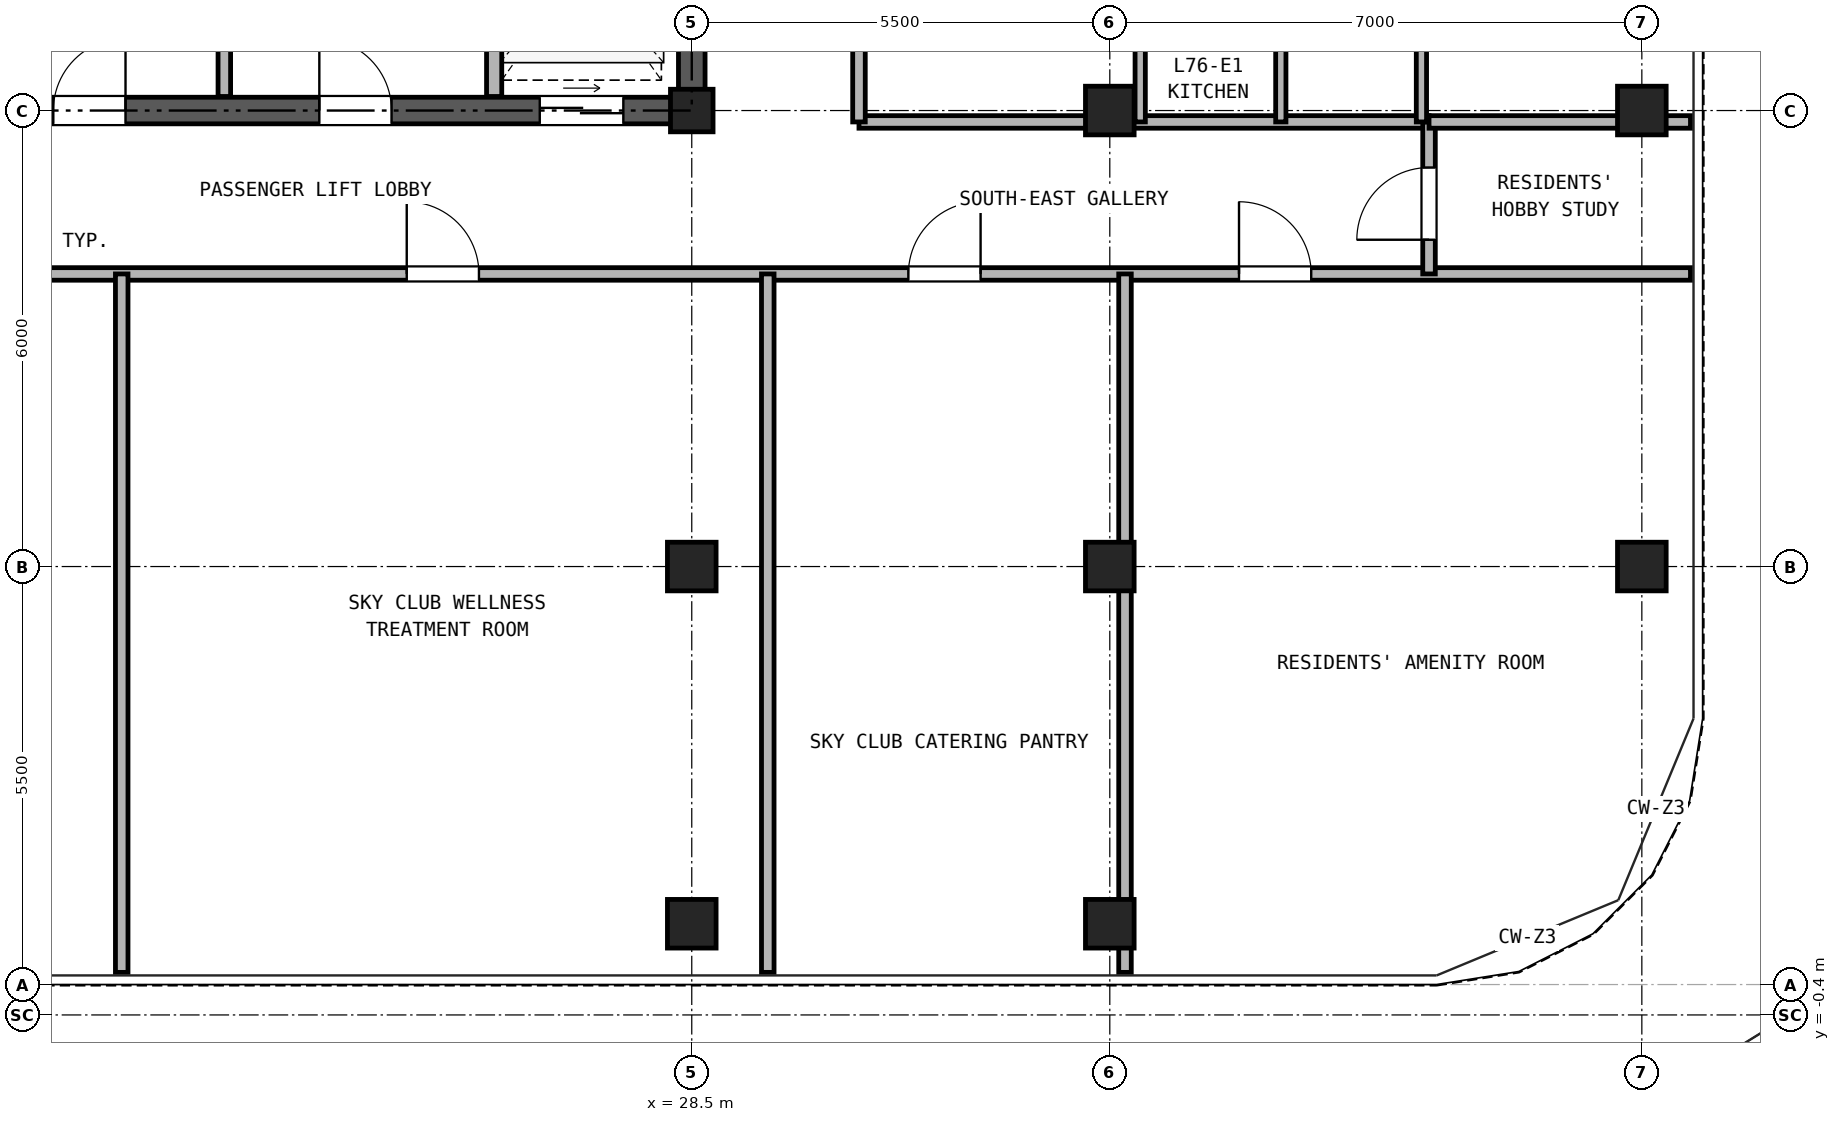
"""IFC4 building model, lengths in metres.
Left out: names, types, materials, properties, quantities, classifications, styles, units other than length and angle.
Written with IfcOpenShell. Run it as: python <this file> out.ifc"""

import sys

from ifc_helpers import new_model, si_unit, direction, frame, frame_2d, origin, origin_2d, place, context, subcontext, project, spatial, rectangle, hollow_rectangle, extrude, source, transform, mapped, element, fill, save


model = new_model("IFC4")
c1 = context("Model", 3, precision=1e-05, world=origin(), true_north=direction((0.0, 1.0)))
c2 = subcontext(c1, "Body", "Model", "MODEL_VIEW")
j1 = project(units=[si_unit("LENGTHUNIT", "METRE"), si_unit("PLANEANGLEUNIT", "RADIAN")], contexts=[c1])
p1 = place(None, origin())
s1 = spatial("IfcSite", under=j1, at=p1, CompositionType="ELEMENT")
p2 = place(p1, origin())
s2 = spatial("IfcBuilding", under=s1, at=p2, CompositionType="ELEMENT")
p3 = place(p2, frame((0.0, 0.0, 264.9)))
s3 = spatial("IfcBuildingStorey", under=s2, at=p3, CompositionType="ELEMENT", Elevation=264.9)
m1 = source(origin(), c2, "Body", "SweptSolid", [
    extrude(hollow_rectangle(XDim=0.64, YDim=0.64, WallThickness=0.035, at=origin_2d()), origin(), (0.0, 0.0, 1.0), 2.98),
])
for number, where, z_axis, x_axis in (
    (1, (28.5, 0.8, 0.0), (0.0, 0.0, 1.0), (1.0, 0.0, 0.0)),
    (2, (34.0, 0.8, 0.0), (0.0, 0.0, 1.0), (1.0, 0.0, 0.0)),
    (3, (41.0, 5.5, 0.0), (0.0, 0.0, 1.0), (1.0, 0.0, 0.0)),
    (4, (41.0, 11.5, 0.0), (0.0, 0.0, 1.0), (1.0, 0.0, 0.0)),
    (5, (28.5, 5.5, 0.0), (0.0, 0.0, 1.0), (1.0, 0.0, 0.0)),
):
    element("IfcColumn", number, at=place(p3, frame(where, z_axis=z_axis, x_axis=x_axis)), inside=s3, PredefinedType="COLUMN", context=c2, shape_type="MappedRepresentation", body=[
        mapped(m1, transform((0.0, 0.0, 0.0), x_axis=(1.0, 0.0, 0.0), y_axis=(0.0, 1.0, 0.0), z_axis=(0.0, 0.0, 1.0), scale=1.0)),
    ])
m2 = source(origin(), c2, "Body", "SweptSolid", [
    extrude(hollow_rectangle(XDim=0.56, YDim=0.56, WallThickness=0.03, at=origin_2d()), origin(), (0.0, 0.0, 1.0), 2.98),
])
p4 = place(p3, frame((28.5, 11.5, 0.0), z_axis=(0.0, 0.0, 1.0), x_axis=(1.0, 0.0, 0.0)))
e6 = element("IfcColumn", 6, at=p4, inside=s3, PredefinedType="COLUMN", context=c2, shape_type="MappedRepresentation", body=[
    mapped(m2, transform((0.0, 0.0, 0.0), x_axis=(1.0, 0.0, 0.0), y_axis=(0.0, 1.0, 0.0), z_axis=(0.0, 0.0, 1.0), scale=1.0)),
])
for number, where, z_axis, x_axis in (
    (7, (34.0, 5.5, 0.0), (0.0, 0.0, 1.0), (1.0, 0.0, 0.0)),
    (8, (34.0, 11.5, 0.0), (0.0, 0.0, 1.0), (1.0, 0.0, 0.0)),
):
    element("IfcColumn", number, at=place(p3, frame(where, z_axis=z_axis, x_axis=x_axis)), inside=s3, PredefinedType="COLUMN", context=c2, shape_type="MappedRepresentation", body=[
        mapped(m1, transform((0.0, 0.0, 0.0), x_axis=(1.0, 0.0, 0.0), y_axis=(0.0, 1.0, 0.0), z_axis=(0.0, 0.0, 1.0), scale=1.0)),
    ])
p5 = place(p3, frame((18.325, 11.5, 0.0), z_axis=(0.0, 0.0, 1.0), x_axis=(1.0, 0.0, 0.0)))
e9 = element("IfcWall", 9, at=p5, inside=s3, PredefinedType="SHEAR", context=c2, shape_type="SweptSolid", body=[
    extrude(rectangle(XDim=10.35, YDim=0.35, at=frame_2d((5.175, 0.0))), origin(), (0.0, 0.0, 1.0), 2.98),
])
p6 = place(p5, frame((1.775, 0.0, 0.0)))
e10 = element("IfcOpeningElement", 10, at=p6, cuts=e9, PredefinedType="OPENING", context=c2, shape_type="SweptSolid", body=[
    extrude(rectangle(XDim=0.95, YDim=2.15, at=frame_2d((0.475, 1.075))), frame((0.0, 0.185, 0.0), z_axis=(0.0, -1.0, 0.0), x_axis=(1.0, 0.0, 0.0)), (0.0, 0.0, 1.0), 0.37),
])
p7 = place(p5, frame((5.275, 0.0, 0.0)))
e11 = element("IfcOpeningElement", 11, at=p7, cuts=e9, PredefinedType="OPENING", context=c2, shape_type="SweptSolid", body=[
    extrude(rectangle(XDim=0.95, YDim=2.15, at=frame_2d((0.475, 1.075))), frame((0.0, 0.185, 0.0), z_axis=(0.0, -1.0, 0.0), x_axis=(1.0, 0.0, 0.0)), (0.0, 0.0, 1.0), 0.37),
])
p8 = place(p5, frame((8.175, 0.0, 0.0)))
e12 = element("IfcOpeningElement", 12, at=p8, cuts=e9, PredefinedType="OPENING", context=c2, shape_type="SweptSolid", body=[
    extrude(rectangle(XDim=1.1, YDim=2.25, at=frame_2d((0.55, 1.125))), frame((0.0, 0.185, 0.0), z_axis=(0.0, -1.0, 0.0), x_axis=(1.0, 0.0, 0.0)), (0.0, 0.0, 1.0), 0.37),
])
p9 = place(p3, frame((28.5, 11.675, 0.0), z_axis=(0.0, 0.0, 1.0), x_axis=(0.0, 1.0, 0.0)))
e13 = element("IfcWall", 13, at=p9, inside=s3, PredefinedType="SHEAR", context=c2, shape_type="SweptSolid", body=[
    extrude(rectangle(XDim=16.9, YDim=0.35, at=frame_2d((8.45, 0.0))), origin(), (0.0, 0.0, 1.0), 2.98),
])
p10 = place(p9, frame((7.475, 0.0, 0.0)))
e14 = element("IfcOpeningElement", 14, at=p10, cuts=e13, PredefinedType="OPENING", context=c2, shape_type="SweptSolid", body=[
    extrude(rectangle(XDim=1.15, YDim=2.2, at=frame_2d((0.575, 1.1))), frame((0.0, 0.185, 0.0), z_axis=(0.0, -1.0, 0.0), x_axis=(1.0, 0.0, 0.0)), (0.0, 0.0, 1.0), 0.37),
])
p11 = place(p3, frame((22.35, 11.685, 0.0), z_axis=(0.0, 0.0, 1.0), x_axis=(0.0, 1.0, 0.0)))
e15 = element("IfcWall", 15, at=p11, inside=s3, PredefinedType="PARTITIONING", context=c2, shape_type="SweptSolid", body=[
    extrude(rectangle(XDim=3.315, YDim=0.165, at=frame_2d((1.657, 0.0))), origin(), (0.0, 0.0, 1.0), 2.98),
])
p12 = place(p3, frame((25.9, 11.685, 0.0), z_axis=(0.0, 0.0, 1.0), x_axis=(0.0, 1.0, 0.0)))
e16 = element("IfcWall", 16, at=p12, inside=s3, PredefinedType="PARTITIONING", context=c2, shape_type="SweptSolid", body=[
    extrude(rectangle(XDim=3.315, YDim=0.2, at=frame_2d((1.657, 0.0))), origin(), (0.0, 0.0, 1.0), 2.98),
])
p13 = place(p3, frame((5.36, 9.35, 0.0), z_axis=(0.0, 0.0, 1.0), x_axis=(1.0, 0.0, 0.0)))
e17 = element("IfcWall", 17, at=p13, inside=s3, PredefinedType="PARTITIONING", context=c2, shape_type="SweptSolid", body=[
    extrude(rectangle(XDim=36.28, YDim=0.165, at=frame_2d((18.14, 0.0))), origin(), (0.0, 0.0, 1.0), 2.98),
])
p14 = place(p13, frame((8.92, 0.0, 0.0)))
e18 = element("IfcOpeningElement", 18, at=p14, cuts=e17, PredefinedType="OPENING", context=c2, shape_type="SweptSolid", body=[
    extrude(rectangle(XDim=0.95, YDim=2.15, at=frame_2d((0.475, 1.075))), frame((0.0, 0.093, 0.0), z_axis=(0.0, -1.0, 0.0), x_axis=(1.0, 0.0, 0.0)), (0.0, 0.0, 1.0), 0.185),
])
p15 = place(p13, frame((19.39, 0.0, 0.0)))
e19 = element("IfcOpeningElement", 19, at=p15, cuts=e17, PredefinedType="OPENING", context=c2, shape_type="SweptSolid", body=[
    extrude(rectangle(XDim=0.95, YDim=2.15, at=frame_2d((0.475, 1.075))), frame((0.0, 0.093, 0.0), z_axis=(0.0, -1.0, 0.0), x_axis=(1.0, 0.0, 0.0)), (0.0, 0.0, 1.0), 0.185),
])
p16 = place(p13, frame((25.99, 0.0, 0.0)))
e20 = element("IfcOpeningElement", 20, at=p16, cuts=e17, PredefinedType="OPENING", context=c2, shape_type="SweptSolid", body=[
    extrude(rectangle(XDim=0.95, YDim=2.15, at=frame_2d((0.475, 1.075))), frame((0.0, 0.093, 0.0), z_axis=(0.0, -1.0, 0.0), x_axis=(1.0, 0.0, 0.0)), (0.0, 0.0, 1.0), 0.185),
])
p17 = place(p13, frame((30.34, 0.0, 0.0)))
e21 = element("IfcOpeningElement", 21, at=p17, cuts=e17, PredefinedType="OPENING", context=c2, shape_type="SweptSolid", body=[
    extrude(rectangle(XDim=0.95, YDim=2.15, at=frame_2d((0.475, 1.075))), frame((0.0, 0.093, 0.0), z_axis=(0.0, -1.0, 0.0), x_axis=(1.0, 0.0, 0.0)), (0.0, 0.0, 1.0), 0.185),
])
p18 = place(p3, frame((30.7, 11.35, 0.0), z_axis=(0.0, 0.0, 1.0), x_axis=(1.0, 0.0, 0.0)))
e22 = element("IfcWall", 22, at=p18, inside=s3, PredefinedType="PARTITIONING", context=c2, shape_type="SweptSolid", body=[
    extrude(rectangle(XDim=7.5, YDim=0.165, at=frame_2d((3.75, 0.0))), origin(), (0.0, 0.0, 1.0), 2.428),
])
p19 = place(p3, frame((38.2, 9.35, 0.0), z_axis=(0.0, 0.0, 1.0), x_axis=(0.0, 1.0, 0.0)))
e23 = element("IfcWall", 23, at=p19, inside=s3, PredefinedType="PARTITIONING", context=c2, shape_type="SweptSolid", body=[
    extrude(rectangle(XDim=2.0, YDim=0.165, at=frame_2d((1.0, 0.0))), origin(), (0.0, 0.0, 1.0), 2.98),
])
p20 = place(p19, frame((0.45, 0.0, 0.0)))
e24 = element("IfcOpeningElement", 24, at=p20, cuts=e23, PredefinedType="OPENING", context=c2, shape_type="SweptSolid", body=[
    extrude(rectangle(XDim=0.95, YDim=2.15, at=frame_2d((0.475, 1.075))), frame((0.0, 0.093, 0.0), z_axis=(0.0, -1.0, 0.0), x_axis=(1.0, 0.0, 0.0)), (0.0, 0.0, 1.0), 0.185),
])
p21 = place(p3, frame((30.7, 11.35, 0.0), z_axis=(0.0, 0.0, 1.0), x_axis=(0.0, 1.0, 0.0)))
e25 = element("IfcWall", 25, at=p21, inside=s3, PredefinedType="PARTITIONING", context=c2, shape_type="SweptSolid", body=[
    extrude(rectangle(XDim=23.79, YDim=0.165, at=frame_2d((11.895, 0.0))), origin(), (0.0, 0.0, 1.0), 2.98),
])
p22 = place(p21, frame((4.825, 0.0, 0.0)))
e26 = element("IfcOpeningElement", 26, at=p22, cuts=e25, PredefinedType="OPENING", context=c2, shape_type="SweptSolid", body=[
    extrude(rectangle(XDim=1.0, YDim=2.15, at=frame_2d((0.5, 1.075))), frame((0.0, 0.093, 0.0), z_axis=(0.0, -1.0, 0.0), x_axis=(1.0, 0.0, 0.0)), (0.0, 0.0, 1.0), 0.185),
])
p23 = place(p21, frame((14.475, 0.0, 0.0)))
e27 = element("IfcOpeningElement", 27, at=p23, cuts=e25, PredefinedType="OPENING", context=c2, shape_type="SweptSolid", body=[
    extrude(rectangle(XDim=1.0, YDim=2.15, at=frame_2d((0.5, 1.075))), frame((0.0, 0.093, 0.0), z_axis=(0.0, -1.0, 0.0), x_axis=(1.0, 0.0, 0.0)), (0.0, 0.0, 1.0), 0.185),
])
for number, where, z_axis, x_axis in (
    (28, (21.0, 0.16, 0.0), (0.0, 0.0, 1.0), (0.0, 1.0, 0.0)),
    (29, (29.5, 0.16, 0.0), (0.0, 0.0, 1.0), (0.0, 1.0, 0.0)),
):
    element("IfcWall", number, at=place(p3, frame(where, z_axis=z_axis, x_axis=x_axis)), inside=s3, PredefinedType="PARTITIONING", context=c2, shape_type="SweptSolid", body=[
        extrude(rectangle(XDim=9.19, YDim=0.165, at=frame_2d((4.595, 0.0))), origin(), (0.0, 0.0, 1.0), 2.98),
    ])
p24 = place(p3, frame((34.2, 0.16, 0.0), z_axis=(0.0, 0.0, 1.0), x_axis=(0.0, 1.0, 0.0)))
e30 = element("IfcWall", 30, at=p24, inside=s3, PredefinedType="PARTITIONING", context=c2, shape_type="SweptSolid", body=[
    extrude(rectangle(XDim=9.19, YDim=0.165, at=frame_2d((4.595, 0.0))), origin(), (0.0, 0.0, 1.0), 2.428),
])
p25 = place(p3, frame((38.2, 11.35, 0.0), z_axis=(0.0, 0.0, 1.0), x_axis=(1.0, 0.0, 0.0)))
e31 = element("IfcWall", 31, at=p25, inside=s3, PredefinedType="PARTITIONING", context=c2, shape_type="SweptSolid", body=[
    extrude(rectangle(XDim=3.44, YDim=0.165, at=frame_2d((1.72, 0.0))), origin(), (0.0, 0.0, 1.0), 2.428),
])
for number, where, z_axis, x_axis in (
    (32, (34.4, 11.35, 0.0), (0.0, 0.0, 1.0), (0.0, 1.0, 0.0)),
    (33, (36.25, 11.35, 0.0), (0.0, 0.0, 1.0), (0.0, 1.0, 0.0)),
    (34, (38.1, 11.35, 0.0), (0.0, 0.0, 1.0), (0.0, 1.0, 0.0)),
):
    element("IfcWall", number, at=place(p3, frame(where, z_axis=z_axis, x_axis=x_axis)), inside=s3, PredefinedType="PARTITIONING", context=c2, shape_type="SweptSolid", body=[
        extrude(rectangle(XDim=2.15, YDim=0.135, at=frame_2d((1.075, 0.0))), origin(), (0.0, 0.0, 1.0), 2.98),
    ])
p26 = place(p6, frame((0.95, 0.0, 0.0), z_axis=(0.0, 0.0, 1.0), x_axis=(-1.0, 0.0, 0.0)))
e35 = element("IfcDoor", 35, at=p26, inside=s3, OperationType="SINGLE_SWING_RIGHT", PredefinedType="DOOR", context=c2, shape_type="SweptSolid", body=[
    extrude(rectangle(XDim=0.95, YDim=2.15, at=frame_2d((0.475, 1.075))), frame((0.0, 0.025, 0.0), z_axis=(0.0, -1.0, 0.0), x_axis=(1.0, 0.0, 0.0)), (0.0, 0.0, 1.0), 0.05),
])
fill(e10, e35)
p27 = place(p7, frame((0.95, 0.0, 0.0), z_axis=(0.0, 0.0, 1.0), x_axis=(-1.0, 0.0, 0.0)))
e36 = element("IfcDoor", 36, at=p27, inside=s3, OperationType="SINGLE_SWING_LEFT", PredefinedType="DOOR", context=c2, shape_type="SweptSolid", body=[
    extrude(rectangle(XDim=0.95, YDim=2.15, at=frame_2d((0.475, 1.075))), frame((0.0, 0.025, 0.0), z_axis=(0.0, -1.0, 0.0), x_axis=(1.0, 0.0, 0.0)), (0.0, 0.0, 1.0), 0.05),
])
fill(e11, e36)
p28 = place(p8, frame((1.1, 0.0, 0.0), z_axis=(0.0, 0.0, 1.0), x_axis=(-1.0, 0.0, 0.0)))
e37 = element("IfcDoor", 37, at=p28, inside=s3, OperationType="DOUBLE_DOOR_SLIDING", PredefinedType="DOOR", context=c2, shape_type="SweptSolid", body=[
    extrude(rectangle(XDim=1.1, YDim=2.25, at=frame_2d((0.55, 1.125))), frame((0.0, 0.025, 0.0), z_axis=(0.0, -1.0, 0.0), x_axis=(1.0, 0.0, 0.0)), (0.0, 0.0, 1.0), 0.05),
])
fill(e12, e37)
p29 = place(p15, frame((0.95, 0.0, 0.0), z_axis=(0.0, 0.0, 1.0), x_axis=(-1.0, 0.0, 0.0)))
e38 = element("IfcDoor", 38, at=p29, inside=s3, OperationType="SINGLE_SWING_LEFT", PredefinedType="DOOR", context=c2, shape_type="SweptSolid", body=[
    extrude(rectangle(XDim=0.95, YDim=2.15, at=frame_2d((0.475, 1.075))), frame((0.0, 0.025, 0.0), z_axis=(0.0, -1.0, 0.0), x_axis=(1.0, 0.0, 0.0)), (0.0, 0.0, 1.0), 0.05),
])
fill(e19, e38)
p30 = place(p16, frame((0.95, 0.0, 0.0), z_axis=(0.0, 0.0, 1.0), x_axis=(-1.0, 0.0, 0.0)))
e39 = element("IfcDoor", 39, at=p30, inside=s3, OperationType="SINGLE_SWING_RIGHT", PredefinedType="DOOR", context=c2, shape_type="SweptSolid", body=[
    extrude(rectangle(XDim=0.95, YDim=2.15, at=frame_2d((0.475, 1.075))), frame((0.0, 0.025, 0.0), z_axis=(0.0, -1.0, 0.0), x_axis=(1.0, 0.0, 0.0)), (0.0, 0.0, 1.0), 0.05),
])
fill(e20, e39)
p31 = place(p17, frame((0.95, 0.0, 0.0), z_axis=(0.0, 0.0, 1.0), x_axis=(-1.0, 0.0, 0.0)))
e40 = element("IfcDoor", 40, at=p31, inside=s3, OperationType="SINGLE_SWING_LEFT", PredefinedType="DOOR", context=c2, shape_type="SweptSolid", body=[
    extrude(rectangle(XDim=0.95, YDim=2.15, at=frame_2d((0.475, 1.075))), frame((0.0, 0.025, 0.0), z_axis=(0.0, -1.0, 0.0), x_axis=(1.0, 0.0, 0.0)), (0.0, 0.0, 1.0), 0.05),
])
fill(e21, e40)
p32 = place(p20, origin())
e41 = element("IfcDoor", 41, at=p32, inside=s3, OperationType="SINGLE_SWING_LEFT", PredefinedType="DOOR", context=c2, shape_type="SweptSolid", body=[
    extrude(rectangle(XDim=0.95, YDim=2.15, at=frame_2d((0.475, 1.075))), frame((0.0, 0.025, 0.0), z_axis=(0.0, -1.0, 0.0), x_axis=(1.0, 0.0, 0.0)), (0.0, 0.0, 1.0), 0.05),
])
fill(e24, e41)
save(model, sys.argv[1])
